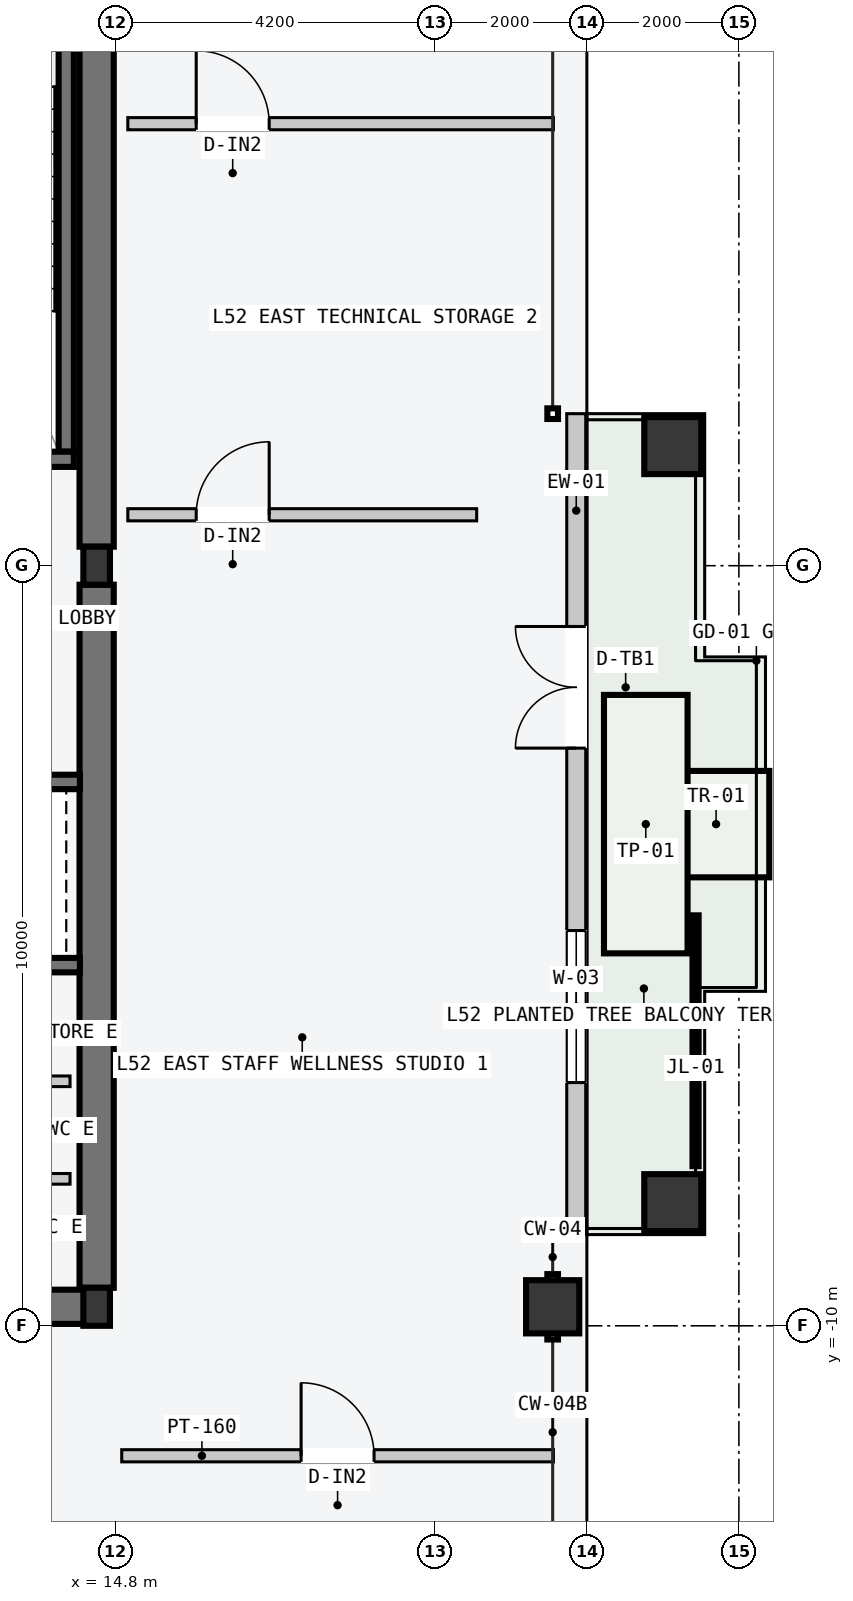
"""IFC4 building model, lengths in metres.
Left out: names, types, materials, properties, quantities, classifications, styles, units other than length and angle.
Written with IfcOpenShell. Run it as: python <this file> out.ifc"""

import sys

from ifc_helpers import new_model, si_unit, direction, frame, frame_2d, origin, origin_2d, place, context, subcontext, project, spatial, rectangle, hollow_rectangle, i_section, extrude, element, fill, save


model = new_model("IFC4")
c1 = context("Model", 3, precision=1e-05, world=origin(), true_north=direction((0.0, 1.0)))
c2 = subcontext(c1, "Body", "Model", "MODEL_VIEW")
j1 = project(units=[si_unit("LENGTHUNIT", "METRE"), si_unit("PLANEANGLEUNIT", "RADIAN")], contexts=[c1])
p1 = place(None, origin())
s1 = spatial("IfcSite", under=j1, at=p1, CompositionType="ELEMENT")
p2 = place(p1, origin())
s2 = spatial("IfcBuilding", under=s1, at=p2, CompositionType="ELEMENT")
p3 = place(p2, frame((0.0, 0.0, 198.3)))
s3 = spatial("IfcBuildingStorey", under=s2, at=p3, CompositionType="ELEMENT", Elevation=198.3)
p4 = place(p3, frame((8.07, -9.75, -0.2), z_axis=(0.0, 0.0, 1.0), x_axis=(1.0, 0.0, 0.0)))
e1 = element("IfcWall", 1, at=p4, inside=s3, PredefinedType="SHEAR", context=c2, shape_type="SweptSolid", body=[
    extrude(rectangle(XDim=6.46, YDim=0.45, at=frame_2d((3.23, 0.0))), origin(), (0.0, 0.0, 1.0), 3.6),
])
for number, where, z_axis, x_axis in (
    (2, (14.55, -9.5, -0.2), (0.0, 0.0, 1.0), (0.0, 1.0, 0.0)),
    (3, (14.55, 0.25, -0.2), (0.0, 0.0, 1.0), (0.0, 1.0, 0.0)),
):
    element("IfcWall", number, at=place(p3, frame(where, z_axis=z_axis, x_axis=x_axis)), inside=s3, PredefinedType="SHEAR", context=c2, shape_type="SweptSolid", body=[
        extrude(rectangle(XDim=9.25, YDim=0.45, at=frame_2d((4.625, 0.0))), origin(), (0.0, 0.0, 1.0), 3.6),
    ])
p5 = place(p3, frame((14.15, 1.5, -0.2), z_axis=(0.0, 0.0, 1.0), x_axis=(0.0, 1.0, 0.0)))
e4 = element("IfcWall", 4, at=p5, inside=s3, PredefinedType="SOLIDWALL", context=c2, shape_type="SweptSolid", body=[
    extrude(rectangle(XDim=7.8, YDim=0.2, at=frame_2d((3.9, 0.0))), origin(), (0.0, 0.0, 1.0), 3.6),
])
p6 = place(p3, frame((10.53, 1.4, -0.2), z_axis=(0.0, 0.0, 1.0), x_axis=(1.0, 0.0, 0.0)))
e5 = element("IfcWall", 5, at=p6, inside=s3, PredefinedType="SOLIDWALL", context=c2, shape_type="SweptSolid", body=[
    extrude(rectangle(XDim=3.72, YDim=0.2, at=frame_2d((1.86, 0.0))), origin(), (0.0, 0.0, 1.0), 3.6),
])
p7 = place(p6, frame((1.5, 0.0, 0.2)))
e6 = element("IfcOpeningElement", 6, at=p7, cuts=e5, PredefinedType="OPENING", context=c2, shape_type="SweptSolid", body=[
    extrude(rectangle(XDim=1.12, YDim=2.18, at=frame_2d((0.56, 1.09))), frame((0.0, 0.11, 0.0), z_axis=(0.0, -1.0, 0.0), x_axis=(1.0, 0.0, 0.0)), (0.0, 0.0, 1.0), 0.22),
])
for number, where, z_axis, x_axis in (
    (7, (14.55, -9.75, 0.0), (0.0, 0.0, 1.0), (1.0, 0.0, 0.0)),
    (8, (14.55, 0.0, 0.0), (0.0, 0.0, 1.0), (1.0, 0.0, 0.0)),
):
    element("IfcColumn", number, at=place(p3, frame(where, z_axis=z_axis, x_axis=x_axis)), inside=s3, PredefinedType="COLUMN", context=c2, shape_type="SweptSolid", body=[
        extrude(i_section(OverallWidth=0.35, OverallDepth=0.5, WebThickness=0.02, FlangeThickness=0.032, at=origin_2d()), origin(), (0.0, 0.0, 1.0), 3.6),
    ])
p8 = place(p3, frame((20.55, -9.75, 0.0), z_axis=(0.0, 0.0, 1.0), x_axis=(0.0, 1.0, 0.0)))
e9 = element("IfcColumn", 9, at=p8, inside=s3, PredefinedType="COLUMN", context=c2, shape_type="SweptSolid", body=[
    extrude(hollow_rectangle(XDim=0.7, YDim=0.7, WallThickness=0.03, at=origin_2d()), origin(), (0.0, 0.0, 1.0), 3.6),
])
for number, where, z_axis, x_axis in (
    (10, (22.13, -8.38, 0.0), (0.0, 0.0, 1.0), (0.0, 1.0, 0.0)),
    (11, (22.13, 1.58, 0.0), (0.0, 0.0, 1.0), (0.0, 1.0, 0.0)),
):
    element("IfcColumn", number, at=place(p3, frame(where, z_axis=z_axis, x_axis=x_axis)), inside=s3, PredefinedType="COLUMN", context=c2, shape_type="SweptSolid", body=[
        extrude(hollow_rectangle(XDim=0.75, YDim=0.75, WallThickness=0.032, at=origin_2d()), origin(), (0.0, 0.0, 1.0), 3.6),
    ])
p9 = place(p3, frame((20.86, -8.8, 0.0), z_axis=(0.0, 0.0, 1.0), x_axis=(0.0, 1.0, 0.0)))
e12 = element("IfcWall", 12, at=p9, inside=s3, PredefinedType="STANDARD", context=c2, shape_type="SweptSolid", body=[
    extrude(rectangle(XDim=10.8, YDim=0.25, at=frame_2d((5.4, 0.0))), origin(), (0.0, 0.0, 1.0), 3.4),
])
p10 = place(p9, frame((6.4, 0.0, 0.0)))
e13 = element("IfcOpeningElement", 13, at=p10, cuts=e12, PredefinedType="OPENING", context=c2, shape_type="SweptSolid", body=[
    extrude(rectangle(XDim=1.6, YDim=2.2, at=frame_2d((0.8, 1.1))), frame((0.0, 0.135, 0.0), z_axis=(0.0, -1.0, 0.0), x_axis=(1.0, 0.0, 0.0)), (0.0, 0.0, 1.0), 0.27),
])
p11 = place(p9, frame((2.0, 0.0, 0.85)))
e14 = element("IfcOpeningElement", 14, at=p11, cuts=e12, PredefinedType="OPENING", context=c2, shape_type="SweptSolid", body=[
    extrude(rectangle(XDim=2.0, YDim=2.1, at=frame_2d((1.0, 1.05))), frame((0.0, 0.135, 0.0), z_axis=(0.0, -1.0, 0.0), x_axis=(1.0, 0.0, 0.0)), (0.0, 0.0, 1.0), 0.27),
])
p12 = place(p3, frame((11.65, -2.845, -0.2), z_axis=(0.0, 0.0, 1.0), x_axis=(1.0, 0.0, 0.0)))
e15 = element("IfcWall", 15, at=p12, inside=s3, PredefinedType="SOLIDWALL", context=c2, shape_type="SweptSolid", body=[
    extrude(rectangle(XDim=2.68, YDim=0.19, at=frame_2d((1.34, 0.0))), origin(), (0.0, 0.0, 1.0), 3.6),
])
p13 = place(p12, frame((0.65, 0.0, 0.2)))
e16 = element("IfcOpeningElement", 16, at=p13, cuts=e15, PredefinedType="OPENING", context=c2, shape_type="SweptSolid", body=[
    extrude(rectangle(XDim=1.2, YDim=2.2, at=frame_2d((0.6, 1.1))), frame((0.0, 0.105, 0.0), z_axis=(0.0, -1.0, 0.0), x_axis=(1.0, 0.0, 0.0)), (0.0, 0.0, 1.0), 0.21),
])
p14 = place(p3, frame((11.65, -5.255, -0.2), z_axis=(0.0, 0.0, 1.0), x_axis=(1.0, 0.0, 0.0)))
e17 = element("IfcWall", 17, at=p14, inside=s3, PredefinedType="SOLIDWALL", context=c2, shape_type="SweptSolid", body=[
    extrude(rectangle(XDim=2.68, YDim=0.19, at=frame_2d((1.34, 0.0))), origin(), (0.0, 0.0, 1.0), 3.6),
])
for number, where, z_axis, x_axis in (
    (18, (11.7, -8.067, 0.0), (0.0, 0.0, 1.0), (1.0, 0.0, 0.0)),
    (19, (11.7, -6.783, 0.0), (0.0, 0.0, 1.0), (1.0, 0.0, 0.0)),
):
    element("IfcWall", number, at=place(p3, frame(where, z_axis=z_axis, x_axis=x_axis)), inside=s3, PredefinedType="PARTITIONING", context=c2, shape_type="SweptSolid", body=[
        extrude(rectangle(XDim=2.5, YDim=0.14, at=frame_2d((1.25, 0.0))), origin(), (0.0, 0.0, 1.0), 3.4),
    ])
p15 = place(p3, frame((14.88, -11.71, 0.0), z_axis=(0.0, 0.0, 1.0), x_axis=(1.0, 0.0, 0.0)))
e20 = element("IfcWall", 20, at=p15, inside=s3, PredefinedType="PARTITIONING", context=c2, shape_type="SweptSolid", body=[
    extrude(rectangle(XDim=5.68, YDim=0.16, at=frame_2d((2.84, 0.0))), origin(), (0.0, 0.0, 1.0), 3.4),
])
p16 = place(p15, frame((2.36, 0.0, 0.0)))
e21 = element("IfcOpeningElement", 21, at=p16, cuts=e20, PredefinedType="OPENING", context=c2, shape_type="SweptSolid", body=[
    extrude(rectangle(XDim=0.96, YDim=2.18, at=frame_2d((0.48, 1.09))), frame((0.0, 0.09, 0.0), z_axis=(0.0, -1.0, 0.0), x_axis=(1.0, 0.0, 0.0)), (0.0, 0.0, 1.0), 0.18),
])
p17 = place(p3, frame((14.96, 0.67, 0.0), z_axis=(0.0, 0.0, 1.0), x_axis=(1.0, 0.0, 0.0)))
e22 = element("IfcWall", 22, at=p17, inside=s3, PredefinedType="PARTITIONING", context=c2, shape_type="SweptSolid", body=[
    extrude(rectangle(XDim=4.59, YDim=0.16, at=frame_2d((2.295, 0.0))), origin(), (0.0, 0.0, 1.0), 3.4),
])
p18 = place(p17, frame((0.9, 0.0, 0.0)))
e23 = element("IfcOpeningElement", 23, at=p18, cuts=e22, PredefinedType="OPENING", context=c2, shape_type="SweptSolid", body=[
    extrude(rectangle(XDim=0.96, YDim=2.18, at=frame_2d((0.48, 1.09))), frame((0.0, 0.09, 0.0), z_axis=(0.0, -1.0, 0.0), x_axis=(1.0, 0.0, 0.0)), (0.0, 0.0, 1.0), 0.18),
])
p19 = place(p3, frame((14.96, 5.815, 0.0), z_axis=(0.0, 0.0, 1.0), x_axis=(1.0, 0.0, 0.0)))
e24 = element("IfcWall", 24, at=p19, inside=s3, PredefinedType="PARTITIONING", context=c2, shape_type="SweptSolid", body=[
    extrude(rectangle(XDim=5.6, YDim=0.16, at=frame_2d((2.8, 0.0))), origin(), (0.0, 0.0, 1.0), 3.4),
])
p20 = place(p19, frame((0.9, 0.0, 0.0)))
e25 = element("IfcOpeningElement", 25, at=p20, cuts=e24, PredefinedType="OPENING", context=c2, shape_type="SweptSolid", body=[
    extrude(rectangle(XDim=0.96, YDim=2.18, at=frame_2d((0.48, 1.09))), frame((0.0, 0.09, 0.0), z_axis=(0.0, -1.0, 0.0), x_axis=(1.0, 0.0, 0.0)), (0.0, 0.0, 1.0), 0.18),
])
p21 = place(p10, origin())
e26 = element("IfcDoor", 26, at=p21, inside=s3, OperationType="DOUBLE_DOOR_SINGLE_SWING", PredefinedType="DOOR", context=c2, shape_type="SweptSolid", body=[
    extrude(rectangle(XDim=1.6, YDim=2.2, at=frame_2d((0.8, 1.1))), frame((0.0, 0.025, 0.0), z_axis=(0.0, -1.0, 0.0), x_axis=(1.0, 0.0, 0.0)), (0.0, 0.0, 1.0), 0.05),
])
fill(e13, e26)
p22 = place(p11, origin())
e27 = element("IfcWindow", 27, at=p22, inside=s3, PartitioningType="SINGLE_PANEL", PredefinedType="WINDOW", context=c2, shape_type="SweptSolid", body=[
    extrude(rectangle(XDim=2.0, YDim=2.1, at=frame_2d((1.0, 1.05))), frame((0.0, 0.03, 0.0), z_axis=(0.0, -1.0, 0.0), x_axis=(1.0, 0.0, 0.0)), (0.0, 0.0, 1.0), 0.06),
])
fill(e14, e27)
p23 = place(p16, origin())
e28 = element("IfcDoor", 28, at=p23, inside=s3, OperationType="SINGLE_SWING_LEFT", PredefinedType="DOOR", context=c2, shape_type="SweptSolid", body=[
    extrude(rectangle(XDim=0.96, YDim=2.18, at=frame_2d((0.48, 1.09))), frame((0.0, 0.025, 0.0), z_axis=(0.0, -1.0, 0.0), x_axis=(1.0, 0.0, 0.0)), (0.0, 0.0, 1.0), 0.05),
])
fill(e21, e28)
p24 = place(p18, origin())
e29 = element("IfcDoor", 29, at=p24, inside=s3, OperationType="SINGLE_SWING_RIGHT", PredefinedType="DOOR", context=c2, shape_type="SweptSolid", body=[
    extrude(rectangle(XDim=0.96, YDim=2.18, at=frame_2d((0.48, 1.09))), frame((0.0, 0.025, 0.0), z_axis=(0.0, -1.0, 0.0), x_axis=(1.0, 0.0, 0.0)), (0.0, 0.0, 1.0), 0.05),
])
fill(e23, e29)
p25 = place(p20, origin())
e30 = element("IfcDoor", 30, at=p25, inside=s3, OperationType="SINGLE_SWING_LEFT", PredefinedType="DOOR", context=c2, shape_type="SweptSolid", body=[
    extrude(rectangle(XDim=0.96, YDim=2.18, at=frame_2d((0.48, 1.09))), frame((0.0, 0.025, 0.0), z_axis=(0.0, -1.0, 0.0), x_axis=(1.0, 0.0, 0.0)), (0.0, 0.0, 1.0), 0.05),
])
fill(e25, e30)
save(model, sys.argv[1])
